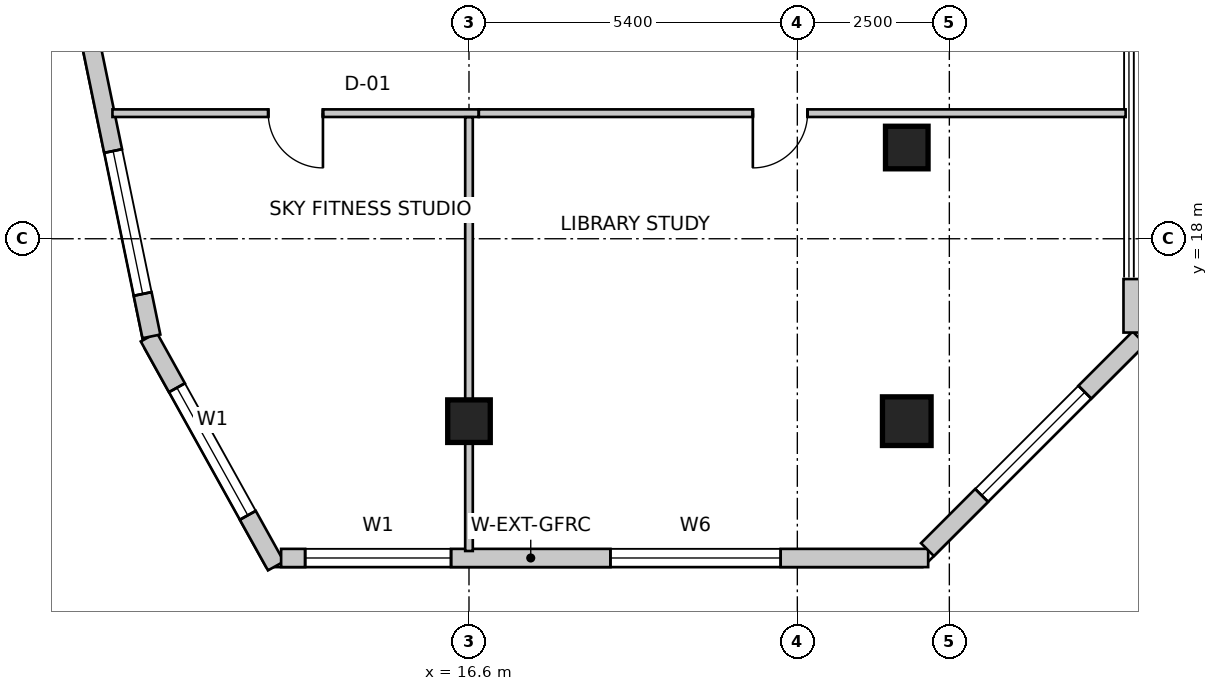
"""IFC4 building model, lengths in metres.
Left out: names, types, materials, properties, quantities, classifications, styles, units other than length and angle.
Written with IfcOpenShell. Run it as: python <this file> out.ifc"""

import sys

from ifc_helpers import new_model, si_unit, direction, frame, frame_2d, origin, origin_2d, place, context, subcontext, project, spatial, rectangle, extrude, source, transform, mapped, element, fill, save


model = new_model("IFC4")
c1 = context("Model", 3, precision=1e-05, world=origin(), true_north=direction((0.0, 1.0)))
c2 = subcontext(c1, "Body", "Model", "MODEL_VIEW")
j1 = project(units=[si_unit("LENGTHUNIT", "METRE"), si_unit("PLANEANGLEUNIT", "RADIAN")], contexts=[c1])
p1 = place(None, origin())
s1 = spatial("IfcSite", under=j1, at=p1, CompositionType="ELEMENT")
p2 = place(p1, origin())
s2 = spatial("IfcBuilding", under=s1, at=p2, CompositionType="ELEMENT")
p3 = place(p2, frame((0.0, 0.0, 178.2)))
s3 = spatial("IfcBuildingStorey", under=s2, at=p3, CompositionType="ELEMENT", Elevation=178.2)
m1 = source(origin(), c2, "Body", "SweptSolid", [
    extrude(rectangle(XDim=0.7, YDim=0.7, at=origin_2d()), origin(), (0.0, 0.0, 1.0), 5.2),
])
p4 = place(p3, frame((23.8, 19.5, 0.0), z_axis=(0.0, 0.0, 1.0), x_axis=(1.0, 0.0, 0.0)))
e1 = element("IfcColumn", 1, at=p4, inside=s3, PredefinedType="COLUMN", context=c2, shape_type="MappedRepresentation", body=[
    mapped(m1, transform((0.0, 0.0, 0.0), scale=1.0)),
])
m2 = source(origin(), c2, "Body", "SweptSolid", [
    extrude(rectangle(XDim=0.8, YDim=0.8, at=origin_2d()), origin(), (0.0, 0.0, 1.0), 5.2),
])
p5 = place(p3, frame((23.8, 15.0, 0.0), z_axis=(0.0, 0.0, 1.0), x_axis=(1.0, 0.0, 0.0)))
e2 = element("IfcColumn", 2, at=p5, inside=s3, PredefinedType="COLUMN", context=c2, shape_type="MappedRepresentation", body=[
    mapped(m2, transform((0.0, 0.0, 0.0), scale=1.0)),
])
p6 = place(p3, frame((16.6, 15.0, 0.0), z_axis=(0.0, 0.0, 1.0), x_axis=(1.0, 0.0, 0.0)))
e3 = element("IfcColumn", 3, at=p6, inside=s3, PredefinedType="COLUMN", context=c2, shape_type="MappedRepresentation", body=[
    mapped(m1, transform((0.0, 0.0, 0.0), scale=1.0)),
])
p7 = place(p3, frame((11.333, 16.384, 0.0), z_axis=(0.0, 0.0, 1.0), x_axis=(0.485633305139, -0.874162623852, 0.0)))
e4 = element("IfcWall", 4, at=p7, inside=s3, PredefinedType="SOLIDWALL", context=c2, shape_type="SweptSolid", body=[
    extrude(rectangle(XDim=4.307, YDim=0.3, at=frame_2d((2.153, 0.0))), origin(), (0.0, 0.0, 1.0), 4.95),
])
m3 = source(origin(), c2, "Body", "SweptSolid", [
    extrude(rectangle(XDim=2.4, YDim=2.2, at=frame_2d((1.2, 1.1))), frame((0.0, 0.16, 0.0), z_axis=(0.0, -1.0, 0.0), x_axis=(1.0, 0.0, 0.0)), (0.0, 0.0, 1.0), 0.32),
])
p8 = place(p7, frame((0.954, 0.0, 0.85)))
e5 = element("IfcOpeningElement", 5, at=p8, cuts=e4, PredefinedType="OPENING", context=c2, shape_type="MappedRepresentation", body=[
    mapped(m3, transform((0.0, 0.0, 0.0), scale=1.0)),
])
p9 = place(p3, frame((13.51, 12.75, 0.0), z_axis=(0.0, 0.0, 1.0), x_axis=(1.0, 0.0, 0.0)))
e6 = element("IfcWall", 6, at=p9, inside=s3, PredefinedType="SOLIDWALL", context=c2, shape_type="SweptSolid", body=[
    extrude(rectangle(XDim=10.642, YDim=0.3, at=frame_2d((5.321, 0.0))), origin(), (0.0, 0.0, 1.0), 4.95),
])
p10 = place(p9, frame((0.395, 0.0, 0.85)))
e7 = element("IfcOpeningElement", 7, at=p10, cuts=e6, PredefinedType="OPENING", context=c2, shape_type="MappedRepresentation", body=[
    mapped(m3, transform((0.0, 0.0, 0.0), scale=1.0)),
])
m4 = source(origin(), c2, "Body", "SweptSolid", [
    extrude(rectangle(XDim=2.8, YDim=2.4, at=frame_2d((1.4, 1.2))), frame((0.0, 0.16, 0.0), z_axis=(0.0, -1.0, 0.0), x_axis=(1.0, 0.0, 0.0)), (0.0, 0.0, 1.0), 0.32),
])
p11 = place(p9, frame((5.416, 0.0, 0.85)))
e8 = element("IfcOpeningElement", 8, at=p11, cuts=e6, PredefinedType="OPENING", context=c2, shape_type="MappedRepresentation", body=[
    mapped(m4, transform((0.0, 0.0, 0.0), scale=1.0)),
])
p12 = place(p3, frame((24.14, 12.888, 0.0), z_axis=(0.0, 0.0, 1.0), x_axis=(0.707106781187, 0.707106781187, 0.0)))
e9 = element("IfcWall", 9, at=p12, inside=s3, PredefinedType="SOLIDWALL", context=c2, shape_type="SweptSolid", body=[
    extrude(rectangle(XDim=4.922, YDim=0.3, at=frame_2d((2.461, 0.0))), origin(), (0.0, 0.0, 1.0), 4.95),
])
p13 = place(p12, frame((1.261, 0.0, 0.85)))
e10 = element("IfcOpeningElement", 10, at=p13, cuts=e9, PredefinedType="OPENING", context=c2, shape_type="MappedRepresentation", body=[
    mapped(m3, transform((0.0, 0.0, 0.0), scale=1.0)),
])
p14 = place(p3, frame((27.514, 16.457, 0.0), z_axis=(0.0, 0.0, 1.0), x_axis=(0.0, 1.0, 0.0)))
e11 = element("IfcWall", 11, at=p14, inside=s3, PredefinedType="SOLIDWALL", context=c2, shape_type="SweptSolid", body=[
    extrude(rectangle(XDim=0.88, YDim=0.3, at=frame_2d((0.44, 0.0))), origin(), (0.0, 0.0, 1.0), 4.95),
])
p15 = place(p3, frame((8.188, 31.834, 0.0), z_axis=(0.0, 0.0, 1.0), x_axis=(0.202303475707, -0.979322880217, 0.0)))
e12 = element("IfcWall", 12, at=p15, inside=s3, PredefinedType="SOLIDWALL", context=c2, shape_type="SweptSolid", body=[
    extrude(rectangle(XDim=15.766, YDim=0.3, at=frame_2d((7.883, 0.0))), origin(), (0.0, 0.0, 1.0), 4.95),
])
p16 = place(p15, frame((1.995, 0.0, 0.85)))
e13 = element("IfcOpeningElement", 13, at=p16, cuts=e12, PredefinedType="OPENING", context=c2, shape_type="MappedRepresentation", body=[
    mapped(m3, transform((0.0, 0.0, 0.0), scale=1.0)),
])
p17 = place(p15, frame((7.546, 0.0, 0.85)))
e14 = element("IfcOpeningElement", 14, at=p17, cuts=e12, PredefinedType="OPENING", context=c2, shape_type="MappedRepresentation", body=[
    mapped(m4, transform((0.0, 0.0, 0.0), scale=1.0)),
])
p18 = place(p15, frame((12.653, 0.0, 0.85)))
e15 = element("IfcOpeningElement", 15, at=p18, cuts=e12, PredefinedType="OPENING", context=c2, shape_type="MappedRepresentation", body=[
    mapped(m3, transform((0.0, 0.0, 0.0), scale=1.0)),
])
p19 = place(p3, frame((16.76, 20.065, 0.0), z_axis=(0.0, 0.0, 1.0), x_axis=(-1.0, 0.0, 0.0)))
e16 = element("IfcWall", 16, at=p19, inside=s3, PredefinedType="PARTITIONING", context=c2, shape_type="SweptSolid", body=[
    extrude(rectangle(XDim=6.024, YDim=0.125, at=frame_2d((3.012, 0.0))), origin(), (0.0, 0.0, 1.0), 4.95),
])
m5 = source(origin(), c2, "Body", "SweptSolid", [
    extrude(rectangle(XDim=0.9, YDim=2.15, at=frame_2d((0.45, 1.075))), frame((0.0, 0.073, 0.0), z_axis=(0.0, -1.0, 0.0), x_axis=(1.0, 0.0, 0.0)), (0.0, 0.0, 1.0), 0.145),
])
p20 = place(p19, frame((2.562, 0.0, 0.0)))
e17 = element("IfcOpeningElement", 17, at=p20, cuts=e16, PredefinedType="OPENING", context=c2, shape_type="MappedRepresentation", body=[
    mapped(m5, transform((0.0, 0.0, 0.0), scale=1.0)),
])
p21 = place(p3, frame((27.399, 20.065, 0.0), z_axis=(0.0, 0.0, 1.0), x_axis=(-1.0, 0.0, 0.0)))
e18 = element("IfcWall", 18, at=p21, inside=s3, PredefinedType="PARTITIONING", context=c2, shape_type="SweptSolid", body=[
    extrude(rectangle(XDim=10.637, YDim=0.125, at=frame_2d((5.318, 0.0))), origin(), (0.0, 0.0, 1.0), 4.242),
])
p22 = place(p21, frame((5.231, 0.0, 0.0)))
e19 = element("IfcOpeningElement", 19, at=p22, cuts=e18, PredefinedType="OPENING", context=c2, shape_type="MappedRepresentation", body=[
    mapped(m5, transform((0.0, 0.0, 0.0), scale=1.0)),
])
p23 = place(p3, frame((16.6, 19.999, 0.0), z_axis=(0.0, 0.0, 1.0), x_axis=(0.0, -1.0, 0.0)))
e20 = element("IfcWall", 20, at=p23, inside=s3, PredefinedType="PARTITIONING", context=c2, shape_type="SweptSolid", body=[
    extrude(rectangle(XDim=7.134, YDim=0.125, at=frame_2d((3.567, 0.0))), origin(), (0.0, 0.0, 1.0), 4.242),
])
m6 = source(origin(), c2, "Body", "SweptSolid", [
    extrude(rectangle(XDim=2.4, YDim=2.2, at=frame_2d((1.2, 1.1))), frame((0.0, -0.015, 0.0), z_axis=(0.0, -1.0, 0.0), x_axis=(1.0, 0.0, 0.0)), (0.0, 0.0, 1.0), 0.06),
])
p24 = place(p8, origin())
e21 = element("IfcWindow", 21, at=p24, inside=s3, PartitioningType="SINGLE_PANEL", PredefinedType="WINDOW", context=c2, shape_type="MappedRepresentation", body=[
    mapped(m6, transform((0.0, 0.0, 0.0), scale=1.0)),
])
fill(e5, e21)
p25 = place(p10, origin())
e22 = element("IfcWindow", 22, at=p25, inside=s3, PartitioningType="SINGLE_PANEL", PredefinedType="WINDOW", context=c2, shape_type="MappedRepresentation", body=[
    mapped(m6, transform((0.0, 0.0, 0.0), scale=1.0)),
])
fill(e7, e22)
m7 = source(origin(), c2, "Body", "SweptSolid", [
    extrude(rectangle(XDim=2.8, YDim=2.4, at=frame_2d((1.4, 1.2))), frame((0.0, -0.015, 0.0), z_axis=(0.0, -1.0, 0.0), x_axis=(1.0, 0.0, 0.0)), (0.0, 0.0, 1.0), 0.06),
])
p26 = place(p11, origin())
e23 = element("IfcWindow", 23, at=p26, inside=s3, PartitioningType="SINGLE_PANEL", PredefinedType="WINDOW", context=c2, shape_type="MappedRepresentation", body=[
    mapped(m7, transform((0.0, 0.0, 0.0), scale=1.0)),
])
fill(e8, e23)
p27 = place(p13, origin())
e24 = element("IfcWindow", 24, at=p27, inside=s3, PartitioningType="SINGLE_PANEL", PredefinedType="WINDOW", context=c2, shape_type="MappedRepresentation", body=[
    mapped(m6, transform((0.0, 0.0, 0.0), scale=1.0)),
])
fill(e10, e24)
p28 = place(p18, origin())
e25 = element("IfcWindow", 25, at=p28, inside=s3, PartitioningType="SINGLE_PANEL", PredefinedType="WINDOW", context=c2, shape_type="MappedRepresentation", body=[
    mapped(m6, transform((0.0, 0.0, 0.0), scale=1.0)),
])
fill(e15, e25)
m8 = source(origin(), c2, "Body", "SweptSolid", [
    extrude(rectangle(XDim=0.9, YDim=2.15, at=frame_2d((0.45, 1.075))), frame((0.0, 0.025, 0.0), z_axis=(0.0, -1.0, 0.0), x_axis=(1.0, 0.0, 0.0)), (0.0, 0.0, 1.0), 0.05),
])
p29 = place(p20, origin())
e26 = element("IfcDoor", 26, at=p29, inside=s3, OperationType="SINGLE_SWING_LEFT", PredefinedType="DOOR", context=c2, shape_type="MappedRepresentation", body=[
    mapped(m8, transform((0.0, 0.0, 0.0), scale=1.0)),
])
fill(e17, e26)
p30 = place(p22, origin())
e27 = element("IfcDoor", 27, at=p30, inside=s3, OperationType="SINGLE_SWING_RIGHT", PredefinedType="DOOR", context=c2, shape_type="MappedRepresentation", body=[
    mapped(m8, transform((0.0, 0.0, 0.0), scale=1.0)),
])
fill(e19, e27)
save(model, sys.argv[1])
